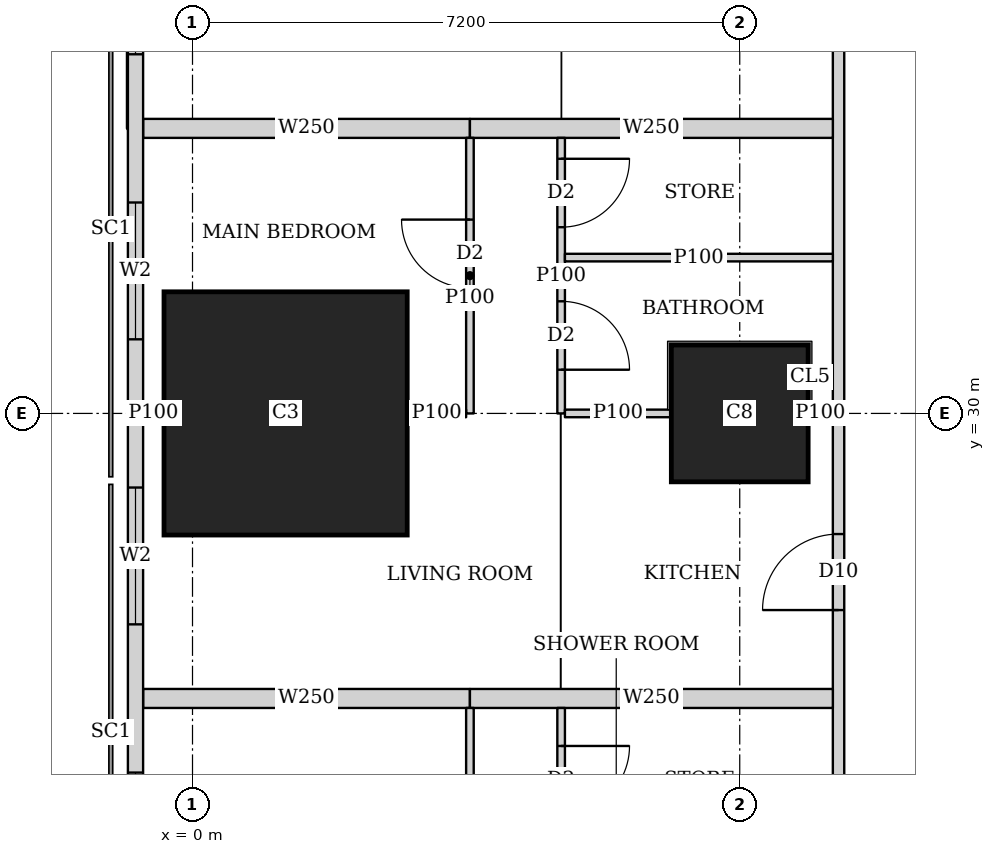
"""IFC4 building model, lengths in metres.
Left out: names, types, materials, properties, quantities, classifications, styles, units other than length and angle.
Written with IfcOpenShell. Run it as: python <this file> out.ifc"""

import sys

from ifc_helpers import new_model, si_unit, direction, frame, frame_2d, origin, origin_2d, place, context, subcontext, project, spatial, rectangle, extrude, element, fill, save


model = new_model("IFC4")
c1 = context("Model", 3, precision=1e-05, world=origin(), true_north=direction((0.0, 1.0)))
c2 = subcontext(c1, "Body", "Model", "MODEL_VIEW")
j1 = project(units=[si_unit("LENGTHUNIT", "METRE"), si_unit("PLANEANGLEUNIT", "RADIAN")], contexts=[c1])
p1 = place(None, origin())
s1 = spatial("IfcSite", under=j1, at=p1, CompositionType="ELEMENT")
p2 = place(p1, origin())
s2 = spatial("IfcBuilding", under=s1, at=p2, CompositionType="ELEMENT")
p3 = place(p2, frame((0.0, 0.0, 20.0)))
s3 = spatial("IfcBuildingStorey", under=s2, at=p3, CompositionType="ELEMENT", Elevation=20.0)
p4 = place(p3, frame((1.225, 30.0, 0.0), z_axis=(0.0, 0.0, 1.0), x_axis=(1.0, 0.0, 0.0)))
e1 = element("IfcColumn", 1, at=p4, inside=s3, PredefinedType="COLUMN", context=c2, shape_type="SweptSolid", body=[
    extrude(rectangle(XDim=3.2, YDim=3.2, at=origin_2d()), origin(), (0.0, 0.0, 1.0), 3.75),
])
p5 = place(p3, frame((7.2, 30.0, 0.0), z_axis=(0.0, 0.0, 1.0), x_axis=(1.0, 0.0, 0.0)))
e2 = element("IfcColumn", 2, at=p5, inside=s3, PredefinedType="COLUMN", context=c2, shape_type="SweptSolid", body=[
    extrude(rectangle(XDim=1.8, YDim=1.8, at=origin_2d()), origin(), (0.0, 0.0, 1.0), 3.75),
])
p6 = place(p3, frame((-0.75, 42.837, 0.0), z_axis=(0.0, 0.0, 1.0), x_axis=(0.0, -1.0, 0.0)))
e3 = element("IfcWall", 3, at=p6, inside=s3, PredefinedType="SOLIDWALL", context=c2, shape_type="SweptSolid", body=[
    extrude(rectangle(XDim=40.674, YDim=0.2, at=frame_2d((20.337, 0.0))), origin(), (0.0, 0.0, 1.0), 3.5),
])
p7 = place(p6, frame((1.78, 0.0, 0.9)))
e4 = element("IfcOpeningElement", 4, at=p7, cuts=e3, PredefinedType="OPENING", context=c2, shape_type="SweptSolid", body=[
    extrude(rectangle(XDim=1.8, YDim=1.5, at=frame_2d((0.9, 0.75))), frame((0.0, 0.11, 0.0), z_axis=(0.0, -1.0, 0.0), x_axis=(1.0, 0.0, 0.0)), (0.0, 0.0, 1.0), 0.22),
])
p8 = place(p6, frame((6.312, 0.0, 0.9)))
e5 = element("IfcOpeningElement", 5, at=p8, cuts=e3, PredefinedType="OPENING", context=c2, shape_type="SweptSolid", body=[
    extrude(rectangle(XDim=1.8, YDim=1.5, at=frame_2d((0.9, 0.75))), frame((0.0, 0.11, 0.0), z_axis=(0.0, -1.0, 0.0), x_axis=(1.0, 0.0, 0.0)), (0.0, 0.0, 1.0), 0.22),
])
p9 = place(p6, frame((10.062, 0.0, 0.9)))
e6 = element("IfcOpeningElement", 6, at=p9, cuts=e3, PredefinedType="OPENING", context=c2, shape_type="SweptSolid", body=[
    extrude(rectangle(XDim=1.8, YDim=1.5, at=frame_2d((0.9, 0.75))), frame((0.0, 0.11, 0.0), z_axis=(0.0, -1.0, 0.0), x_axis=(1.0, 0.0, 0.0)), (0.0, 0.0, 1.0), 0.22),
])
p10 = place(p6, frame((13.812, 0.0, 0.9)))
e7 = element("IfcOpeningElement", 7, at=p10, cuts=e3, PredefinedType="OPENING", context=c2, shape_type="SweptSolid", body=[
    extrude(rectangle(XDim=1.8, YDim=1.5, at=frame_2d((0.9, 0.75))), frame((0.0, 0.11, 0.0), z_axis=(0.0, -1.0, 0.0), x_axis=(1.0, 0.0, 0.0)), (0.0, 0.0, 1.0), 0.22),
])
p11 = place(p6, frame((17.562, 0.0, 0.9)))
e8 = element("IfcOpeningElement", 8, at=p11, cuts=e3, PredefinedType="OPENING", context=c2, shape_type="SweptSolid", body=[
    extrude(rectangle(XDim=1.8, YDim=1.5, at=frame_2d((0.9, 0.75))), frame((0.0, 0.11, 0.0), z_axis=(0.0, -1.0, 0.0), x_axis=(1.0, 0.0, 0.0)), (0.0, 0.0, 1.0), 0.22),
])
p12 = place(p6, frame((21.312, 0.0, 0.9)))
e9 = element("IfcOpeningElement", 9, at=p12, cuts=e3, PredefinedType="OPENING", context=c2, shape_type="SweptSolid", body=[
    extrude(rectangle(XDim=1.8, YDim=1.5, at=frame_2d((0.9, 0.75))), frame((0.0, 0.11, 0.0), z_axis=(0.0, -1.0, 0.0), x_axis=(1.0, 0.0, 0.0)), (0.0, 0.0, 1.0), 0.22),
])
p13 = place(p6, frame((25.062, 0.0, 0.9)))
e10 = element("IfcOpeningElement", 10, at=p13, cuts=e3, PredefinedType="OPENING", context=c2, shape_type="SweptSolid", body=[
    extrude(rectangle(XDim=1.8, YDim=1.5, at=frame_2d((0.9, 0.75))), frame((0.0, 0.11, 0.0), z_axis=(0.0, -1.0, 0.0), x_axis=(1.0, 0.0, 0.0)), (0.0, 0.0, 1.0), 0.22),
])
p14 = place(p6, frame((28.812, 0.0, 0.9)))
e11 = element("IfcOpeningElement", 11, at=p14, cuts=e3, PredefinedType="OPENING", context=c2, shape_type="SweptSolid", body=[
    extrude(rectangle(XDim=1.8, YDim=1.5, at=frame_2d((0.9, 0.75))), frame((0.0, 0.11, 0.0), z_axis=(0.0, -1.0, 0.0), x_axis=(1.0, 0.0, 0.0)), (0.0, 0.0, 1.0), 0.22),
])
p15 = place(p6, frame((32.562, 0.0, 0.9)))
e12 = element("IfcOpeningElement", 12, at=p15, cuts=e3, PredefinedType="OPENING", context=c2, shape_type="SweptSolid", body=[
    extrude(rectangle(XDim=1.8, YDim=1.5, at=frame_2d((0.9, 0.75))), frame((0.0, 0.11, 0.0), z_axis=(0.0, -1.0, 0.0), x_axis=(1.0, 0.0, 0.0)), (0.0, 0.0, 1.0), 0.22),
])
p16 = place(p6, frame((37.094, 0.0, 0.9)))
e13 = element("IfcOpeningElement", 13, at=p16, cuts=e3, PredefinedType="OPENING", context=c2, shape_type="SweptSolid", body=[
    extrude(rectangle(XDim=1.8, YDim=1.5, at=frame_2d((0.9, 0.75))), frame((0.0, 0.11, 0.0), z_axis=(0.0, -1.0, 0.0), x_axis=(1.0, 0.0, 0.0)), (0.0, 0.0, 1.0), 0.22),
])
p17 = place(p3, frame((8.5, 2.626, 0.0), z_axis=(0.0, 0.0, 1.0), x_axis=(0.0, 1.0, 0.0)))
e14 = element("IfcWall", 14, at=p17, inside=s3, PredefinedType="SOLIDWALL", context=c2, shape_type="SweptSolid", body=[
    extrude(rectangle(XDim=39.773, YDim=0.15, at=frame_2d((19.886, 0.0))), origin(), (0.0, 0.0, 1.0), 2.05),
])
p18 = place(p17, frame((9.786, 0.0, 0.0)))
e15 = element("IfcOpeningElement", 15, at=p18, cuts=e14, PredefinedType="OPENING", context=c2, shape_type="SweptSolid", body=[
    extrude(rectangle(XDim=1.0, YDim=2.0, at=frame_2d((0.5, 1.0))), frame((0.0, 0.085, 0.0), z_axis=(0.0, -1.0, 0.0), x_axis=(1.0, 0.0, 0.0)), (0.0, 0.0, 1.0), 0.17),
])
p19 = place(p17, frame((13.961, 0.0, 0.0)))
e16 = element("IfcOpeningElement", 16, at=p19, cuts=e14, PredefinedType="OPENING", context=c2, shape_type="SweptSolid", body=[
    extrude(rectangle(XDim=1.0, YDim=2.0, at=frame_2d((0.5, 1.0))), frame((0.0, 0.085, 0.0), z_axis=(0.0, -1.0, 0.0), x_axis=(1.0, 0.0, 0.0)), (0.0, 0.0, 1.0), 0.17),
])
p20 = place(p17, frame((24.787, 0.0, 0.0)))
e17 = element("IfcOpeningElement", 17, at=p20, cuts=e14, PredefinedType="OPENING", context=c2, shape_type="SweptSolid", body=[
    extrude(rectangle(XDim=1.0, YDim=2.0, at=frame_2d((0.5, 1.0))), frame((0.0, 0.085, 0.0), z_axis=(0.0, -1.0, 0.0), x_axis=(1.0, 0.0, 0.0)), (0.0, 0.0, 1.0), 0.17),
])
p21 = place(p17, frame((32.287, 0.0, 0.0)))
e18 = element("IfcOpeningElement", 18, at=p21, cuts=e14, PredefinedType="OPENING", context=c2, shape_type="SweptSolid", body=[
    extrude(rectangle(XDim=1.0, YDim=2.0, at=frame_2d((0.5, 1.0))), frame((0.0, 0.085, 0.0), z_axis=(0.0, -1.0, 0.0), x_axis=(1.0, 0.0, 0.0)), (0.0, 0.0, 1.0), 0.17),
])
p22 = place(p3, frame((3.65, 18.75, 0.0), z_axis=(0.0, 0.0, 1.0), x_axis=(0.0, 1.0, 0.0)))
e19 = element("IfcWall", 19, at=p22, inside=s3, PredefinedType="PARTITIONING", context=c2, shape_type="SweptSolid", body=[
    extrude(rectangle(XDim=7.375, YDim=0.1, at=frame_2d((3.688, 0.0))), origin(), (0.0, 0.0, 1.0), 3.5),
])
p23 = place(p22, frame((0.2, 0.0, 0.0)))
e20 = element("IfcOpeningElement", 20, at=p23, cuts=e19, PredefinedType="OPENING", context=c2, shape_type="SweptSolid", body=[
    extrude(rectangle(XDim=0.9, YDim=2.1, at=frame_2d((0.45, 1.05))), frame((0.0, 0.06, 0.0), z_axis=(0.0, -1.0, 0.0), x_axis=(1.0, 0.0, 0.0)), (0.0, 0.0, 1.0), 0.12),
])
p24 = place(p22, frame((5.4, 0.0, 0.0)))
e21 = element("IfcOpeningElement", 21, at=p24, cuts=e19, PredefinedType="OPENING", context=c2, shape_type="SweptSolid", body=[
    extrude(rectangle(XDim=0.9, YDim=2.1, at=frame_2d((0.45, 1.05))), frame((0.0, 0.06, 0.0), z_axis=(0.0, -1.0, 0.0), x_axis=(1.0, 0.0, 0.0)), (0.0, 0.0, 1.0), 0.12),
])
p25 = place(p3, frame((4.85, 18.75, 0.0), z_axis=(0.0, 0.0, 1.0), x_axis=(0.0, 1.0, 0.0)))
e22 = element("IfcWall", 22, at=p25, inside=s3, PredefinedType="PARTITIONING", context=c2, shape_type="SweptSolid", body=[
    extrude(rectangle(XDim=7.375, YDim=0.1, at=frame_2d((3.688, 0.0))), origin(), (0.0, 0.0, 1.0), 3.5),
])
p26 = place(p25, frame((0.575, 0.0, 0.0)))
e23 = element("IfcOpeningElement", 23, at=p26, cuts=e22, PredefinedType="OPENING", context=c2, shape_type="SweptSolid", body=[
    extrude(rectangle(XDim=0.9, YDim=2.1, at=frame_2d((0.45, 1.05))), frame((0.0, 0.06, 0.0), z_axis=(0.0, -1.0, 0.0), x_axis=(1.0, 0.0, 0.0)), (0.0, 0.0, 1.0), 0.12),
])
p27 = place(p25, frame((4.1, 0.0, 0.0)))
e24 = element("IfcOpeningElement", 24, at=p27, cuts=e22, PredefinedType="OPENING", context=c2, shape_type="SweptSolid", body=[
    extrude(rectangle(XDim=0.9, YDim=2.1, at=frame_2d((0.45, 1.05))), frame((0.0, 0.06, 0.0), z_axis=(0.0, -1.0, 0.0), x_axis=(1.0, 0.0, 0.0)), (0.0, 0.0, 1.0), 0.12),
])
p28 = place(p25, frame((2.45, 0.0, 0.0)))
e25 = element("IfcOpeningElement", 25, at=p28, cuts=e22, PredefinedType="OPENING", context=c2, shape_type="SweptSolid", body=[
    extrude(rectangle(XDim=0.9, YDim=2.1, at=frame_2d((0.45, 1.05))), frame((0.0, 0.06, 0.0), z_axis=(0.0, -1.0, 0.0), x_axis=(1.0, 0.0, 0.0)), (0.0, 0.0, 1.0), 0.12),
])
p29 = place(p25, frame((5.975, 0.0, 0.0)))
e26 = element("IfcOpeningElement", 26, at=p29, cuts=e22, PredefinedType="OPENING", context=c2, shape_type="SweptSolid", body=[
    extrude(rectangle(XDim=0.9, YDim=2.1, at=frame_2d((0.45, 1.05))), frame((0.0, 0.06, 0.0), z_axis=(0.0, -1.0, 0.0), x_axis=(1.0, 0.0, 0.0)), (0.0, 0.0, 1.0), 0.12),
])
p30 = place(p3, frame((3.65, 30.0, 0.0), z_axis=(0.0, 0.0, 1.0), x_axis=(0.0, 1.0, 0.0)))
e27 = element("IfcWall", 27, at=p30, inside=s3, PredefinedType="PARTITIONING", context=c2, shape_type="SweptSolid", body=[
    extrude(rectangle(XDim=3.625, YDim=0.1, at=frame_2d((1.812, 0.0))), origin(), (0.0, 0.0, 1.0), 3.5),
])
p31 = place(p30, frame((1.65, 0.0, 0.0)))
e28 = element("IfcOpeningElement", 28, at=p31, cuts=e27, PredefinedType="OPENING", context=c2, shape_type="SweptSolid", body=[
    extrude(rectangle(XDim=0.9, YDim=2.1, at=frame_2d((0.45, 1.05))), frame((0.0, 0.06, 0.0), z_axis=(0.0, -1.0, 0.0), x_axis=(1.0, 0.0, 0.0)), (0.0, 0.0, 1.0), 0.12),
])
p32 = place(p3, frame((4.85, 30.0, 0.0), z_axis=(0.0, 0.0, 1.0), x_axis=(0.0, 1.0, 0.0)))
e29 = element("IfcWall", 29, at=p32, inside=s3, PredefinedType="PARTITIONING", context=c2, shape_type="SweptSolid", body=[
    extrude(rectangle(XDim=3.625, YDim=0.1, at=frame_2d((1.812, 0.0))), origin(), (0.0, 0.0, 1.0), 3.5),
])
p33 = place(p32, frame((0.575, 0.0, 0.0)))
e30 = element("IfcOpeningElement", 30, at=p33, cuts=e29, PredefinedType="OPENING", context=c2, shape_type="SweptSolid", body=[
    extrude(rectangle(XDim=0.9, YDim=2.1, at=frame_2d((0.45, 1.05))), frame((0.0, 0.06, 0.0), z_axis=(0.0, -1.0, 0.0), x_axis=(1.0, 0.0, 0.0)), (0.0, 0.0, 1.0), 0.12),
])
p34 = place(p32, frame((2.45, 0.0, 0.0)))
e31 = element("IfcOpeningElement", 31, at=p34, cuts=e29, PredefinedType="OPENING", context=c2, shape_type="SweptSolid", body=[
    extrude(rectangle(XDim=0.9, YDim=2.1, at=frame_2d((0.45, 1.05))), frame((0.0, 0.06, 0.0), z_axis=(0.0, -1.0, 0.0), x_axis=(1.0, 0.0, 0.0)), (0.0, 0.0, 1.0), 0.12),
])
p35 = place(p3, frame((-0.65, 30.0, 0.0), z_axis=(0.0, 0.0, 1.0), x_axis=(1.0, 0.0, 0.0)))
e32 = element("IfcWall", 32, at=p35, inside=s3, PredefinedType="PARTITIONING", context=c2, shape_type="SweptSolid", body=[
    extrude(rectangle(XDim=0.274, YDim=0.1, at=frame_2d((0.137, 0.0))), origin(), (0.0, 0.0, 1.0), 3.5),
])
p36 = place(p3, frame((2.826, 30.0, 0.0), z_axis=(0.0, 0.0, 1.0), x_axis=(1.0, 0.0, 0.0)))
e33 = element("IfcWall", 33, at=p36, inside=s3, PredefinedType="PARTITIONING", context=c2, shape_type="SweptSolid", body=[
    extrude(rectangle(XDim=0.774, YDim=0.1, at=frame_2d((0.387, 0.0))), origin(), (0.0, 0.0, 1.0), 3.5),
])
p37 = place(p3, frame((4.9, 30.0, 0.0), z_axis=(0.0, 0.0, 1.0), x_axis=(1.0, 0.0, 0.0)))
e34 = element("IfcWall", 34, at=p37, inside=s3, PredefinedType="PARTITIONING", context=c2, shape_type="SweptSolid", body=[
    extrude(rectangle(XDim=1.399, YDim=0.1, at=frame_2d((0.7, 0.0))), origin(), (0.0, 0.0, 1.0), 3.5),
])
p38 = place(p3, frame((8.101, 30.0, 0.0), z_axis=(0.0, 0.0, 1.0), x_axis=(1.0, 0.0, 0.0)))
e35 = element("IfcWall", 35, at=p38, inside=s3, PredefinedType="PARTITIONING", context=c2, shape_type="SweptSolid", body=[
    extrude(rectangle(XDim=0.324, YDim=0.1, at=frame_2d((0.162, 0.0))), origin(), (0.0, 0.0, 1.0), 3.5),
])
p39 = place(p3, frame((4.9, 32.05, 0.0), z_axis=(0.0, 0.0, 1.0), x_axis=(1.0, 0.0, 0.0)))
e36 = element("IfcWall", 36, at=p39, inside=s3, PredefinedType="PARTITIONING", context=c2, shape_type="SweptSolid", body=[
    extrude(rectangle(XDim=3.525, YDim=0.1, at=frame_2d((1.763, 0.0))), origin(), (0.0, 0.0, 1.0), 3.5),
])
p40 = place(p3, frame((-0.65, 26.25, 0.0), z_axis=(0.0, 0.0, 1.0), x_axis=(1.0, 0.0, 0.0)))
e37 = element("IfcWall", 37, at=p40, inside=s3, PredefinedType="SOLIDWALL", context=c2, shape_type="SweptSolid", body=[
    extrude(rectangle(XDim=4.3, YDim=0.25, at=frame_2d((2.15, 0.0))), origin(), (0.0, 0.0, 1.0), 2.05),
])
p41 = place(p3, frame((3.65, 26.25, 0.0), z_axis=(0.0, 0.0, 1.0), x_axis=(1.0, 0.0, 0.0)))
e38 = element("IfcWall", 38, at=p41, inside=s3, PredefinedType="SOLIDWALL", context=c2, shape_type="SweptSolid", body=[
    extrude(rectangle(XDim=4.775, YDim=0.25, at=frame_2d((2.388, 0.0))), origin(), (0.0, 0.0, 1.0), 3.5),
])
p42 = place(p3, frame((-0.65, 33.75, 0.0), z_axis=(0.0, 0.0, 1.0), x_axis=(1.0, 0.0, 0.0)))
e39 = element("IfcWall", 39, at=p42, inside=s3, PredefinedType="SOLIDWALL", context=c2, shape_type="SweptSolid", body=[
    extrude(rectangle(XDim=4.3, YDim=0.25, at=frame_2d((2.15, 0.0))), origin(), (0.0, 0.0, 1.0), 2.05),
])
p43 = place(p3, frame((3.65, 33.75, 0.0), z_axis=(0.0, 0.0, 1.0), x_axis=(1.0, 0.0, 0.0)))
e40 = element("IfcWall", 40, at=p43, inside=s3, PredefinedType="SOLIDWALL", context=c2, shape_type="SweptSolid", body=[
    extrude(rectangle(XDim=4.775, YDim=0.25, at=frame_2d((2.388, 0.0))), origin(), (0.0, 0.0, 1.0), 3.5),
])
p44 = place(p8, origin())
e41 = element("IfcWindow", 41, at=p44, inside=s3, PartitioningType="SINGLE_PANEL", PredefinedType="WINDOW", context=c2, shape_type="SweptSolid", body=[
    extrude(rectangle(XDim=1.8, YDim=1.5, at=frame_2d((0.9, 0.75))), frame((0.0, 0.03, 0.0), z_axis=(0.0, -1.0, 0.0), x_axis=(1.0, 0.0, 0.0)), (0.0, 0.0, 1.0), 0.06),
])
fill(e5, e41)
p45 = place(p9, origin())
e42 = element("IfcWindow", 42, at=p45, inside=s3, PartitioningType="SINGLE_PANEL", PredefinedType="WINDOW", context=c2, shape_type="SweptSolid", body=[
    extrude(rectangle(XDim=1.8, YDim=1.5, at=frame_2d((0.9, 0.75))), frame((0.0, 0.03, 0.0), z_axis=(0.0, -1.0, 0.0), x_axis=(1.0, 0.0, 0.0)), (0.0, 0.0, 1.0), 0.06),
])
fill(e6, e42)
p46 = place(p10, origin())
e43 = element("IfcWindow", 43, at=p46, inside=s3, PartitioningType="SINGLE_PANEL", PredefinedType="WINDOW", context=c2, shape_type="SweptSolid", body=[
    extrude(rectangle(XDim=1.8, YDim=1.5, at=frame_2d((0.9, 0.75))), frame((0.0, 0.03, 0.0), z_axis=(0.0, -1.0, 0.0), x_axis=(1.0, 0.0, 0.0)), (0.0, 0.0, 1.0), 0.06),
])
fill(e7, e43)
p47 = place(p11, origin())
e44 = element("IfcWindow", 44, at=p47, inside=s3, PartitioningType="SINGLE_PANEL", PredefinedType="WINDOW", context=c2, shape_type="SweptSolid", body=[
    extrude(rectangle(XDim=1.8, YDim=1.5, at=frame_2d((0.9, 0.75))), frame((0.0, 0.03, 0.0), z_axis=(0.0, -1.0, 0.0), x_axis=(1.0, 0.0, 0.0)), (0.0, 0.0, 1.0), 0.06),
])
fill(e8, e44)
p48 = place(p29, origin())
e45 = element("IfcDoor", 45, at=p48, inside=s3, OperationType="SINGLE_SWING_LEFT", PredefinedType="DOOR", context=c2, shape_type="SweptSolid", body=[
    extrude(rectangle(XDim=0.9, YDim=2.1, at=frame_2d((0.45, 1.05))), frame((0.0, 0.025, 0.0), z_axis=(0.0, -1.0, 0.0), x_axis=(1.0, 0.0, 0.0)), (0.0, 0.0, 1.0), 0.05),
])
fill(e26, e45)
p49 = place(p31, origin())
e46 = element("IfcDoor", 46, at=p49, inside=s3, OperationType="SINGLE_SWING_RIGHT", PredefinedType="DOOR", context=c2, shape_type="SweptSolid", body=[
    extrude(rectangle(XDim=0.9, YDim=2.1, at=frame_2d((0.45, 1.05))), frame((0.0, 0.025, 0.0), z_axis=(0.0, -1.0, 0.0), x_axis=(1.0, 0.0, 0.0)), (0.0, 0.0, 1.0), 0.05),
])
fill(e28, e46)
p50 = place(p33, origin())
e47 = element("IfcDoor", 47, at=p50, inside=s3, OperationType="SINGLE_SWING_RIGHT", PredefinedType="DOOR", context=c2, shape_type="SweptSolid", body=[
    extrude(rectangle(XDim=0.9, YDim=2.1, at=frame_2d((0.45, 1.05))), frame((0.0, 0.025, 0.0), z_axis=(0.0, -1.0, 0.0), x_axis=(1.0, 0.0, 0.0)), (0.0, 0.0, 1.0), 0.05),
])
fill(e30, e47)
p51 = place(p34, origin())
e48 = element("IfcDoor", 48, at=p51, inside=s3, OperationType="SINGLE_SWING_LEFT", PredefinedType="DOOR", context=c2, shape_type="SweptSolid", body=[
    extrude(rectangle(XDim=0.9, YDim=2.1, at=frame_2d((0.45, 1.05))), frame((0.0, 0.025, 0.0), z_axis=(0.0, -1.0, 0.0), x_axis=(1.0, 0.0, 0.0)), (0.0, 0.0, 1.0), 0.05),
])
fill(e31, e48)
p52 = place(p20, origin())
e49 = element("IfcDoor", 49, at=p52, inside=s3, OperationType="SINGLE_SWING_LEFT", PredefinedType="DOOR", context=c2, shape_type="SweptSolid", body=[
    extrude(rectangle(XDim=1.0, YDim=2.0, at=frame_2d((0.5, 1.0))), frame((0.0, 0.025, 0.0), z_axis=(0.0, -1.0, 0.0), x_axis=(1.0, 0.0, 0.0)), (0.0, 0.0, 1.0), 0.05),
])
fill(e17, e49)
save(model, sys.argv[1])
